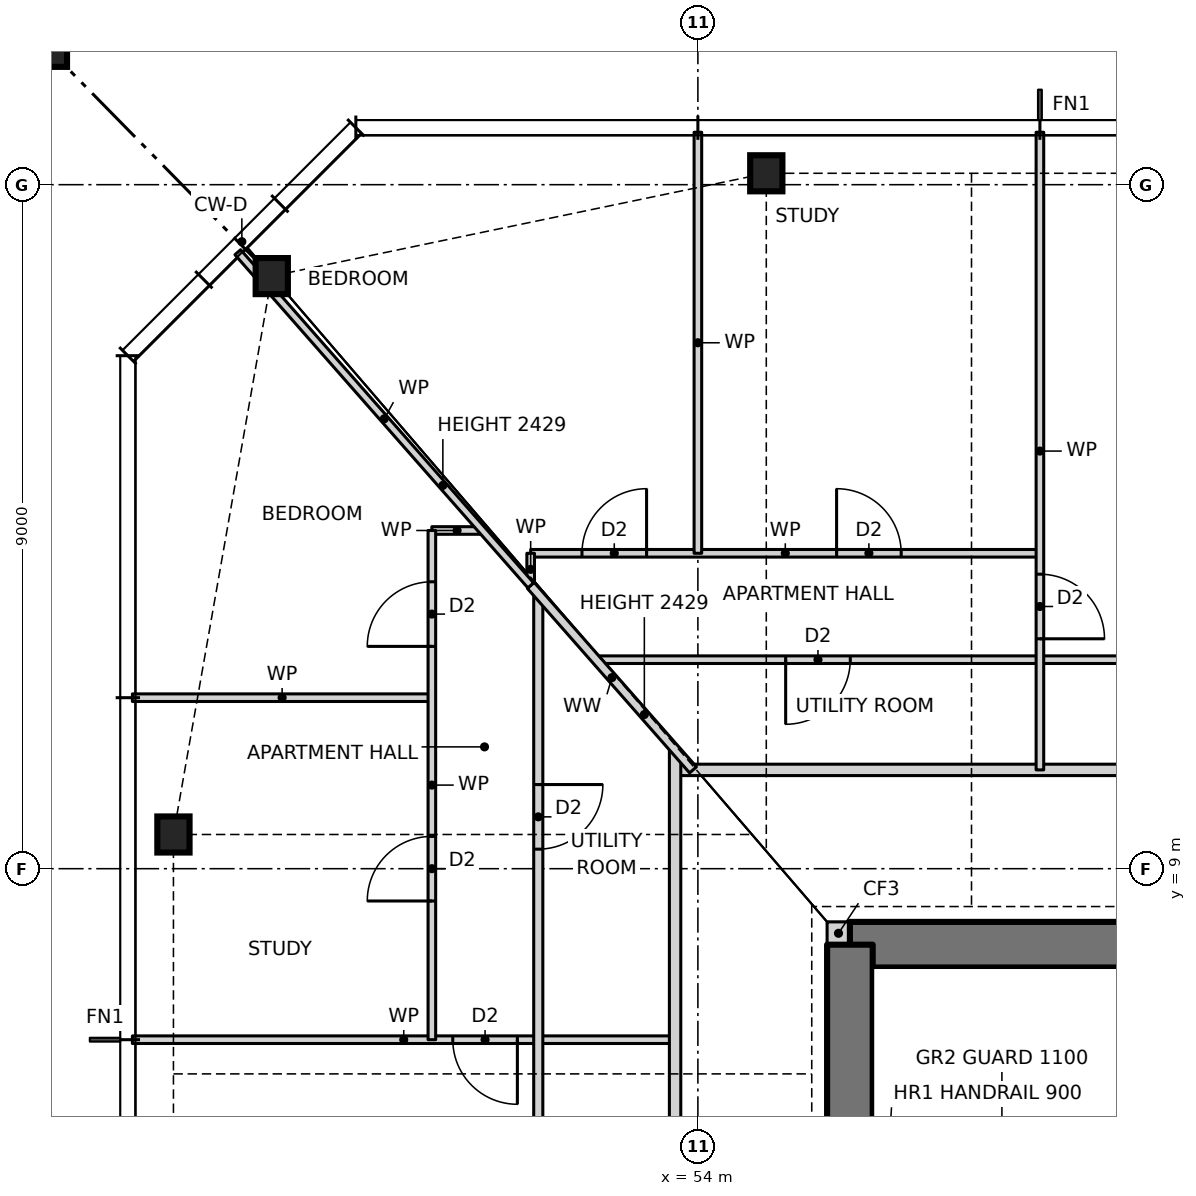
"""IFC4 building model, lengths in metres.
Left out: names, types, materials, properties, quantities, classifications, styles, units other than length and angle.
Written with IfcOpenShell. Run it as: python <this file> out.ifc"""

import sys

from ifc_helpers import new_model, si_unit, direction, frame, frame_2d, origin, origin_2d, place, context, subcontext, project, spatial, rectangle, hollow_rectangle, i_section, extrude, element, fill, save


model = new_model("IFC4")
c1 = context("Model", 3, precision=1e-05, world=origin(), true_north=direction((0.0, 1.0)))
c2 = subcontext(c1, "Body", "Model", "MODEL_VIEW")
j1 = project(units=[si_unit("LENGTHUNIT", "METRE"), si_unit("PLANEANGLEUNIT", "RADIAN")], contexts=[c1])
p1 = place(None, origin())
s1 = spatial("IfcSite", under=j1, at=p1, CompositionType="ELEMENT")
p2 = place(p1, origin())
s2 = spatial("IfcBuilding", under=s1, at=p2, CompositionType="ELEMENT")
p3 = place(p2, frame((0.0, 0.0, 32.5)))
s3 = spatial("IfcBuildingStorey", under=s2, at=p3, CompositionType="ELEMENT", Elevation=32.5)
for number, where, z_axis, x_axis in (
    (1, (54.9, 18.15, 0.0), (0.0, 0.0, 1.0), (1.0, 0.0, 0.0)),
    (2, (48.394, 16.797, 0.0), (0.0, 0.0, 1.0), (1.0, 0.0, 0.0)),
    (3, (47.1, 9.45, 0.0), (0.0, 0.0, 1.0), (1.0, 0.0, 0.0)),
):
    element("IfcColumn", number, at=place(p3, frame(where, z_axis=z_axis, x_axis=x_axis)), inside=s3, PredefinedType="COLUMN", context=c2, shape_type="SweptSolid", body=[
        extrude(i_section(OverallWidth=0.424, OverallDepth=0.475, WebThickness=0.048, FlangeThickness=0.077, at=origin_2d()), origin(), (0.0, 0.0, 1.0), 3.5),
    ])
p4 = place(p3, frame((45.1, 20.15, 0.0), z_axis=(0.0, 0.0, 1.0), x_axis=(1.0, 0.0, 0.0)))
e4 = element("IfcColumn", 4, at=p4, inside=s3, PredefinedType="COLUMN", context=c2, shape_type="SweptSolid", body=[
    extrude(hollow_rectangle(XDim=1.2, YDim=1.2, WallThickness=0.07, at=origin_2d()), origin(), (0.0, 0.0, 1.0), 3.5),
])
p5 = place(p3, frame((55.7, 8.15, 0.0), z_axis=(0.0, 0.0, 1.0), x_axis=(1.0, 0.0, 0.0)))
e5 = element("IfcWall", 5, at=p5, inside=s3, PredefinedType="SOLIDWALL", context=c2, shape_type="SweptSolid", body=[
    extrude(rectangle(XDim=0.3, YDim=0.3, at=frame_2d((0.15, 0.0))), origin(), (0.0, 0.0, 1.0), 3.5),
])
p6 = place(p3, frame((70.0, 8.0, 0.0), z_axis=(0.0, 0.0, 1.0), x_axis=(-1.0, 0.0, 0.0)))
e6 = element("IfcWall", 6, at=p6, inside=s3, PredefinedType="SHEAR", context=c2, shape_type="SweptSolid", body=[
    extrude(rectangle(XDim=14.0, YDim=0.6, at=frame_2d((7.0, 0.0))), origin(), (0.0, 0.0, 1.0), 3.5),
])
p7 = place(p6, frame((8.2, 0.0, 0.0)))
e7 = element("IfcOpeningElement", 7, at=p7, cuts=e6, PredefinedType="OPENING", context=c2, shape_type="SweptSolid", body=[
    extrude(rectangle(XDim=0.9, YDim=2.1, at=frame_2d((0.45, 1.05))), frame((0.0, 0.31, 0.0), z_axis=(0.0, -1.0, 0.0), x_axis=(1.0, 0.0, 0.0)), (0.0, 0.0, 1.0), 0.62),
])
p8 = place(p6, frame((3.2, 0.0, 0.0)))
e8 = element("IfcOpeningElement", 8, at=p8, cuts=e6, PredefinedType="OPENING", context=c2, shape_type="SweptSolid", body=[
    extrude(rectangle(XDim=0.9, YDim=2.1, at=frame_2d((0.45, 1.05))), frame((0.0, 0.31, 0.0), z_axis=(0.0, -1.0, 0.0), x_axis=(1.0, 0.0, 0.0)), (0.0, 0.0, 1.0), 0.62),
])
p9 = place(p3, frame((56.0, 8.0, 0.0), z_axis=(0.0, 0.0, 1.0), x_axis=(0.0, -1.0, 0.0)))
e9 = element("IfcWall", 9, at=p9, inside=s3, PredefinedType="SHEAR", context=c2, shape_type="SweptSolid", body=[
    extrude(rectangle(XDim=16.0, YDim=0.6, at=frame_2d((8.0, 0.0))), origin(), (0.0, 0.0, 1.0), 3.5),
])
p10 = place(p9, frame((7.5, 0.0, 0.0)))
e10 = element("IfcOpeningElement", 10, at=p10, cuts=e9, PredefinedType="OPENING", context=c2, shape_type="SweptSolid", body=[
    extrude(rectangle(XDim=1.0, YDim=2.1, at=frame_2d((0.5, 1.05))), frame((0.0, 0.31, 0.0), z_axis=(0.0, -1.0, 0.0), x_axis=(1.0, 0.0, 0.0)), (0.0, 0.0, 1.0), 0.62),
])
p11 = place(p3, frame((46.56, 6.75, 0.0), z_axis=(0.0, 0.0, 1.0), x_axis=(1.0, 0.0, 0.0)))
e11 = element("IfcWall", 11, at=p11, inside=s3, PredefinedType="PARTITIONING", context=c2, shape_type="SweptSolid", body=[
    extrude(rectangle(XDim=7.14, YDim=0.1, at=frame_2d((3.57, 0.0))), origin(), (0.0, 0.0, 1.0), 3.27),
])
p12 = place(p11, frame((4.215, 0.0, 0.0)))
e12 = element("IfcOpeningElement", 12, at=p12, cuts=e11, PredefinedType="OPENING", context=c2, shape_type="SweptSolid", body=[
    extrude(rectangle(XDim=0.85, YDim=2.1, at=frame_2d((0.425, 1.05))), frame((0.0, 0.06, 0.0), z_axis=(0.0, -1.0, 0.0), x_axis=(1.0, 0.0, 0.0)), (0.0, 0.0, 1.0), 0.12),
])
p13 = place(p3, frame((53.7, 10.3, 0.0), z_axis=(0.0, 0.0, 1.0), x_axis=(1.0, 0.0, 0.0)))
e13 = element("IfcWall", 13, at=p13, inside=s3, PredefinedType="PARTITIONING", context=c2, shape_type="SweptSolid", body=[
    extrude(rectangle(XDim=18.6, YDim=0.15, at=frame_2d((9.3, 0.0))), origin(), (0.0, 0.0, 1.0), 3.27),
])
p14 = place(p13, frame((8.3, 0.0, 0.0)))
e14 = element("IfcOpeningElement", 14, at=p14, cuts=e13, PredefinedType="OPENING", context=c2, shape_type="SweptSolid", body=[
    extrude(rectangle(XDim=1.0, YDim=2.1, at=frame_2d((0.5, 1.05))), frame((0.0, 0.085, 0.0), z_axis=(0.0, -1.0, 0.0), x_axis=(1.0, 0.0, 0.0)), (0.0, 0.0, 1.0), 0.17),
])
p15 = place(p3, frame((46.56, 11.25, 0.0), z_axis=(0.0, 0.0, 1.0), x_axis=(1.0, 0.0, 0.0)))
e15 = element("IfcWall", 15, at=p15, inside=s3, PredefinedType="PARTITIONING", context=c2, shape_type="SweptSolid", body=[
    extrude(rectangle(XDim=3.94, YDim=0.1, at=frame_2d((1.97, 0.0))), origin(), (0.0, 0.0, 1.0), 3.27),
])
p16 = place(p3, frame((52.66, 11.75, 0.0), z_axis=(0.0, 0.0, 1.0), x_axis=(1.0, 0.0, 0.0)))
e16 = element("IfcWall", 16, at=p16, inside=s3, PredefinedType="PARTITIONING", context=c2, shape_type="SweptSolid", body=[
    extrude(rectangle(XDim=20.68, YDim=0.1, at=frame_2d((10.34, 0.0))), origin(), (0.0, 0.0, 1.0), 3.27),
])
p17 = place(p16, frame((12.615, 0.0, 0.0)))
e17 = element("IfcOpeningElement", 17, at=p17, cuts=e16, PredefinedType="OPENING", context=c2, shape_type="SweptSolid", body=[
    extrude(rectangle(XDim=0.85, YDim=2.1, at=frame_2d((0.425, 1.05))), frame((0.0, 0.06, 0.0), z_axis=(0.0, -1.0, 0.0), x_axis=(1.0, 0.0, 0.0)), (0.0, 0.0, 1.0), 0.12),
])
p18 = place(p16, frame((9.415, 0.0, 0.0)))
e18 = element("IfcOpeningElement", 18, at=p18, cuts=e16, PredefinedType="OPENING", context=c2, shape_type="SweptSolid", body=[
    extrude(rectangle(XDim=0.85, YDim=2.1, at=frame_2d((0.425, 1.05))), frame((0.0, 0.06, 0.0), z_axis=(0.0, -1.0, 0.0), x_axis=(1.0, 0.0, 0.0)), (0.0, 0.0, 1.0), 0.12),
])
p19 = place(p16, frame((17.335, 0.0, 0.0)))
e19 = element("IfcOpeningElement", 19, at=p19, cuts=e16, PredefinedType="OPENING", context=c2, shape_type="SweptSolid", body=[
    extrude(rectangle(XDim=0.85, YDim=2.1, at=frame_2d((0.425, 1.05))), frame((0.0, 0.06, 0.0), z_axis=(0.0, -1.0, 0.0), x_axis=(1.0, 0.0, 0.0)), (0.0, 0.0, 1.0), 0.12),
])
p20 = place(p16, frame((2.495, 0.0, 0.0)))
e20 = element("IfcOpeningElement", 20, at=p20, cuts=e16, PredefinedType="OPENING", context=c2, shape_type="SweptSolid", body=[
    extrude(rectangle(XDim=0.85, YDim=2.1, at=frame_2d((0.425, 1.05))), frame((0.0, 0.06, 0.0), z_axis=(0.0, -1.0, 0.0), x_axis=(1.0, 0.0, 0.0)), (0.0, 0.0, 1.0), 0.12),
])
p21 = place(p3, frame((51.8, 13.15, 0.0), z_axis=(0.0, 0.0, 1.0), x_axis=(1.0, 0.0, 0.0)))
e21 = element("IfcWall", 21, at=p21, inside=s3, PredefinedType="PARTITIONING", context=c2, shape_type="SweptSolid", body=[
    extrude(rectangle(XDim=6.7, YDim=0.1, at=frame_2d((3.35, 0.0))), origin(), (0.0, 0.0, 1.0), 3.27),
])
p22 = place(p21, frame((4.025, 0.0, 0.0)))
e22 = element("IfcOpeningElement", 22, at=p22, cuts=e21, PredefinedType="OPENING", context=c2, shape_type="SweptSolid", body=[
    extrude(rectangle(XDim=0.85, YDim=2.1, at=frame_2d((0.425, 1.05))), frame((0.0, 0.06, 0.0), z_axis=(0.0, -1.0, 0.0), x_axis=(1.0, 0.0, 0.0)), (0.0, 0.0, 1.0), 0.12),
])
p23 = place(p21, frame((0.675, 0.0, 0.0)))
e23 = element("IfcOpeningElement", 23, at=p23, cuts=e21, PredefinedType="OPENING", context=c2, shape_type="SweptSolid", body=[
    extrude(rectangle(XDim=0.85, YDim=2.1, at=frame_2d((0.425, 1.05))), frame((0.0, 0.06, 0.0), z_axis=(0.0, -1.0, 0.0), x_axis=(1.0, 0.0, 0.0)), (0.0, 0.0, 1.0), 0.12),
])
p24 = place(p3, frame((50.5, 13.45, 0.0), z_axis=(0.0, 0.0, 1.0), x_axis=(1.0, 0.0, 0.0)))
e24 = element("IfcWall", 24, at=p24, inside=s3, PredefinedType="PARTITIONING", context=c2, shape_type="SweptSolid", body=[
    extrude(rectangle(XDim=0.664, YDim=0.1, at=frame_2d((0.332, 0.0))), origin(), (0.0, 0.0, 1.0), 3.27),
])
p25 = place(p3, frame((58.5, 10.3, 0.0), z_axis=(0.0, 0.0, 1.0), x_axis=(0.0, 1.0, 0.0)))
e25 = element("IfcWall", 25, at=p25, inside=s3, PredefinedType="PARTITIONING", context=c2, shape_type="SweptSolid", body=[
    extrude(rectangle(XDim=8.39, YDim=0.1, at=frame_2d((4.195, 0.0))), origin(), (0.0, 0.0, 1.0), 3.27),
])
p26 = place(p25, frame((1.725, 0.0, 0.0)))
e26 = element("IfcOpeningElement", 26, at=p26, cuts=e25, PredefinedType="OPENING", context=c2, shape_type="SweptSolid", body=[
    extrude(rectangle(XDim=0.85, YDim=2.1, at=frame_2d((0.425, 1.05))), frame((0.0, 0.06, 0.0), z_axis=(0.0, -1.0, 0.0), x_axis=(1.0, 0.0, 0.0)), (0.0, 0.0, 1.0), 0.12),
])
p27 = place(p3, frame((54.0, 13.15, 0.0), z_axis=(0.0, 0.0, 1.0), x_axis=(0.0, 1.0, 0.0)))
e27 = element("IfcWall", 27, at=p27, inside=s3, PredefinedType="PARTITIONING", context=c2, shape_type="SweptSolid", body=[
    extrude(rectangle(XDim=5.54, YDim=0.1, at=frame_2d((2.77, 0.0))), origin(), (0.0, 0.0, 1.0), 3.27),
])
p28 = place(p3, frame((53.7, -10.568, 0.0), z_axis=(0.0, 0.0, 1.0), x_axis=(0.0, 1.0, 0.0)))
e28 = element("IfcWall", 28, at=p28, inside=s3, PredefinedType="PARTITIONING", context=c2, shape_type="SweptSolid", body=[
    extrude(rectangle(XDim=21.136, YDim=0.15, at=frame_2d((10.568, 0.0))), origin(), (0.0, 0.0, 1.0), 3.27),
])
p29 = place(p28, frame((11.818, 0.0, 0.0)))
e29 = element("IfcOpeningElement", 29, at=p29, cuts=e28, PredefinedType="OPENING", context=c2, shape_type="SweptSolid", body=[
    extrude(rectangle(XDim=1.0, YDim=2.1, at=frame_2d((0.5, 1.05))), frame((0.0, 0.085, 0.0), z_axis=(0.0, -1.0, 0.0), x_axis=(1.0, 0.0, 0.0)), (0.0, 0.0, 1.0), 0.17),
])
p30 = place(p3, frame((51.9, -12.614, 0.0), z_axis=(0.0, 0.0, 1.0), x_axis=(0.0, 1.0, 0.0)))
e30 = element("IfcWall", 30, at=p30, inside=s3, PredefinedType="PARTITIONING", context=c2, shape_type="SweptSolid", body=[
    extrude(rectangle(XDim=25.228, YDim=0.12, at=frame_2d((12.614, 0.0))), origin(), (0.0, 0.0, 1.0), 3.27),
])
p31 = place(p30, frame((17.139, 0.0, 0.0)))
e31 = element("IfcOpeningElement", 31, at=p31, cuts=e30, PredefinedType="OPENING", context=c2, shape_type="SweptSolid", body=[
    extrude(rectangle(XDim=0.85, YDim=2.1, at=frame_2d((0.425, 1.05))), frame((0.0, 0.07, 0.0), z_axis=(0.0, -1.0, 0.0), x_axis=(1.0, 0.0, 0.0)), (0.0, 0.0, 1.0), 0.14),
])
p32 = place(p30, frame((13.939, 0.0, 0.0)))
e32 = element("IfcOpeningElement", 32, at=p32, cuts=e30, PredefinedType="OPENING", context=c2, shape_type="SweptSolid", body=[
    extrude(rectangle(XDim=0.85, YDim=2.1, at=frame_2d((0.425, 1.05))), frame((0.0, 0.07, 0.0), z_axis=(0.0, -1.0, 0.0), x_axis=(1.0, 0.0, 0.0)), (0.0, 0.0, 1.0), 0.14),
])
p33 = place(p30, frame((21.871, 0.0, 0.0)))
e33 = element("IfcOpeningElement", 33, at=p33, cuts=e30, PredefinedType="OPENING", context=c2, shape_type="SweptSolid", body=[
    extrude(rectangle(XDim=0.85, YDim=2.1, at=frame_2d((0.425, 1.05))), frame((0.0, 0.07, 0.0), z_axis=(0.0, -1.0, 0.0), x_axis=(1.0, 0.0, 0.0)), (0.0, 0.0, 1.0), 0.14),
])
p34 = place(p30, frame((7.739, 0.0, 0.0)))
e34 = element("IfcOpeningElement", 34, at=p34, cuts=e30, PredefinedType="OPENING", context=c2, shape_type="SweptSolid", body=[
    extrude(rectangle(XDim=0.85, YDim=2.1, at=frame_2d((0.425, 1.05))), frame((0.0, 0.07, 0.0), z_axis=(0.0, -1.0, 0.0), x_axis=(1.0, 0.0, 0.0)), (0.0, 0.0, 1.0), 0.14),
])
p35 = place(p30, frame((2.557, 0.0, 0.0)))
e35 = element("IfcOpeningElement", 35, at=p35, cuts=e30, PredefinedType="OPENING", context=c2, shape_type="SweptSolid", body=[
    extrude(rectangle(XDim=0.85, YDim=2.1, at=frame_2d((0.425, 1.05))), frame((0.0, 0.07, 0.0), z_axis=(0.0, -1.0, 0.0), x_axis=(1.0, 0.0, 0.0)), (0.0, 0.0, 1.0), 0.14),
])
p36 = place(p3, frame((51.8, 12.727, 0.0), z_axis=(0.0, 0.0, 1.0), x_axis=(0.0, 1.0, 0.0)))
e36 = element("IfcWall", 36, at=p36, inside=s3, PredefinedType="PARTITIONING", context=c2, shape_type="SweptSolid", body=[
    extrude(rectangle(XDim=0.423, YDim=0.1, at=frame_2d((0.211, 0.0))), origin(), (0.0, 0.0, 1.0), 3.27),
])
p37 = place(p3, frame((50.5, 6.75, 0.0), z_axis=(0.0, 0.0, 1.0), x_axis=(0.0, 1.0, 0.0)))
e37 = element("IfcWall", 37, at=p37, inside=s3, PredefinedType="PARTITIONING", context=c2, shape_type="SweptSolid", body=[
    extrude(rectangle(XDim=6.7, YDim=0.1, at=frame_2d((3.35, 0.0))), origin(), (0.0, 0.0, 1.0), 3.27),
])
p38 = place(p37, frame((1.825, 0.0, 0.0)))
e38 = element("IfcOpeningElement", 38, at=p38, cuts=e37, PredefinedType="OPENING", context=c2, shape_type="SweptSolid", body=[
    extrude(rectangle(XDim=0.85, YDim=2.1, at=frame_2d((0.425, 1.05))), frame((0.0, 0.06, 0.0), z_axis=(0.0, -1.0, 0.0), x_axis=(1.0, 0.0, 0.0)), (0.0, 0.0, 1.0), 0.12),
])
p39 = place(p37, frame((5.175, 0.0, 0.0)))
e39 = element("IfcOpeningElement", 39, at=p39, cuts=e37, PredefinedType="OPENING", context=c2, shape_type="SweptSolid", body=[
    extrude(rectangle(XDim=0.85, YDim=2.1, at=frame_2d((0.425, 1.05))), frame((0.0, 0.06, 0.0), z_axis=(0.0, -1.0, 0.0), x_axis=(1.0, 0.0, 0.0)), (0.0, 0.0, 1.0), 0.12),
])
p40 = place(p3, frame((53.936, 10.3, 0.0), z_axis=(0.0, 0.0, 1.0), x_axis=(-0.660384426006, 0.750927699508, 0.0)))
e40 = element("IfcWall", 40, at=p40, inside=s3, PredefinedType="PARTITIONING", context=c2, shape_type="SweptSolid", body=[
    extrude(rectangle(XDim=3.233, YDim=0.12, at=frame_2d((1.616, 0.0))), origin(), (0.0, 0.0, 1.0), 2.429),
])
p41 = place(p3, frame((51.801, 12.728, 0.0), z_axis=(0.0, 0.0, 1.0), x_axis=(-0.660356300202, 0.750952433103, 0.0)))
e41 = element("IfcWall", 41, at=p41, inside=s3, PredefinedType="PARTITIONING", context=c2, shape_type="SweptSolid", body=[
    extrude(rectangle(XDim=5.837, YDim=0.1, at=frame_2d((2.918, 0.0))), origin(), (0.0, 0.0, 1.0), 2.429),
])
p42 = place(p26, frame((0.85, 0.0, 0.0), z_axis=(0.0, 0.0, 1.0), x_axis=(-1.0, 0.0, 0.0)))
e42 = element("IfcDoor", 42, at=p42, inside=s3, OperationType="SINGLE_SWING_RIGHT", PredefinedType="DOOR", context=c2, shape_type="SweptSolid", body=[
    extrude(rectangle(XDim=0.85, YDim=2.1, at=frame_2d((0.425, 1.05))), frame((0.0, 0.025, 0.0), z_axis=(0.0, -1.0, 0.0), x_axis=(1.0, 0.0, 0.0)), (0.0, 0.0, 1.0), 0.05),
])
fill(e26, e42)
p43 = place(p22, origin())
e43 = element("IfcDoor", 43, at=p43, inside=s3, OperationType="SINGLE_SWING_LEFT", PredefinedType="DOOR", context=c2, shape_type="SweptSolid", body=[
    extrude(rectangle(XDim=0.85, YDim=2.1, at=frame_2d((0.425, 1.05))), frame((0.0, 0.025, 0.0), z_axis=(0.0, -1.0, 0.0), x_axis=(1.0, 0.0, 0.0)), (0.0, 0.0, 1.0), 0.05),
])
fill(e22, e43)
p44 = place(p23, origin())
e44 = element("IfcDoor", 44, at=p44, inside=s3, OperationType="SINGLE_SWING_RIGHT", PredefinedType="DOOR", context=c2, shape_type="SweptSolid", body=[
    extrude(rectangle(XDim=0.85, YDim=2.1, at=frame_2d((0.425, 1.05))), frame((0.0, 0.025, 0.0), z_axis=(0.0, -1.0, 0.0), x_axis=(1.0, 0.0, 0.0)), (0.0, 0.0, 1.0), 0.05),
])
fill(e23, e44)
p45 = place(p20, frame((0.85, 0.0, 0.0), z_axis=(0.0, 0.0, 1.0), x_axis=(-1.0, 0.0, 0.0)))
e45 = element("IfcDoor", 45, at=p45, inside=s3, OperationType="SINGLE_SWING_RIGHT", PredefinedType="DOOR", context=c2, shape_type="SweptSolid", body=[
    extrude(rectangle(XDim=0.85, YDim=2.1, at=frame_2d((0.425, 1.05))), frame((0.0, 0.025, 0.0), z_axis=(0.0, -1.0, 0.0), x_axis=(1.0, 0.0, 0.0)), (0.0, 0.0, 1.0), 0.05),
])
fill(e20, e45)
p46 = place(p12, frame((0.85, 0.0, 0.0), z_axis=(0.0, 0.0, 1.0), x_axis=(-1.0, 0.0, 0.0)))
e46 = element("IfcDoor", 46, at=p46, inside=s3, OperationType="SINGLE_SWING_LEFT", PredefinedType="DOOR", context=c2, shape_type="SweptSolid", body=[
    extrude(rectangle(XDim=0.85, YDim=2.1, at=frame_2d((0.425, 1.05))), frame((0.0, 0.025, 0.0), z_axis=(0.0, -1.0, 0.0), x_axis=(1.0, 0.0, 0.0)), (0.0, 0.0, 1.0), 0.05),
])
fill(e12, e46)
p47 = place(p38, origin())
e47 = element("IfcDoor", 47, at=p47, inside=s3, OperationType="SINGLE_SWING_LEFT", PredefinedType="DOOR", context=c2, shape_type="SweptSolid", body=[
    extrude(rectangle(XDim=0.85, YDim=2.1, at=frame_2d((0.425, 1.05))), frame((0.0, 0.025, 0.0), z_axis=(0.0, -1.0, 0.0), x_axis=(1.0, 0.0, 0.0)), (0.0, 0.0, 1.0), 0.05),
])
fill(e38, e47)
p48 = place(p39, origin())
e48 = element("IfcDoor", 48, at=p48, inside=s3, OperationType="SINGLE_SWING_LEFT", PredefinedType="DOOR", context=c2, shape_type="SweptSolid", body=[
    extrude(rectangle(XDim=0.85, YDim=2.1, at=frame_2d((0.425, 1.05))), frame((0.0, 0.025, 0.0), z_axis=(0.0, -1.0, 0.0), x_axis=(1.0, 0.0, 0.0)), (0.0, 0.0, 1.0), 0.05),
])
fill(e39, e48)
p49 = place(p33, frame((0.85, 0.0, 0.0), z_axis=(0.0, 0.0, 1.0), x_axis=(-1.0, 0.0, 0.0)))
e49 = element("IfcDoor", 49, at=p49, inside=s3, OperationType="SINGLE_SWING_LEFT", PredefinedType="DOOR", context=c2, shape_type="SweptSolid", body=[
    extrude(rectangle(XDim=0.85, YDim=2.1, at=frame_2d((0.425, 1.05))), frame((0.0, 0.025, 0.0), z_axis=(0.0, -1.0, 0.0), x_axis=(1.0, 0.0, 0.0)), (0.0, 0.0, 1.0), 0.05),
])
fill(e33, e49)
save(model, sys.argv[1])
